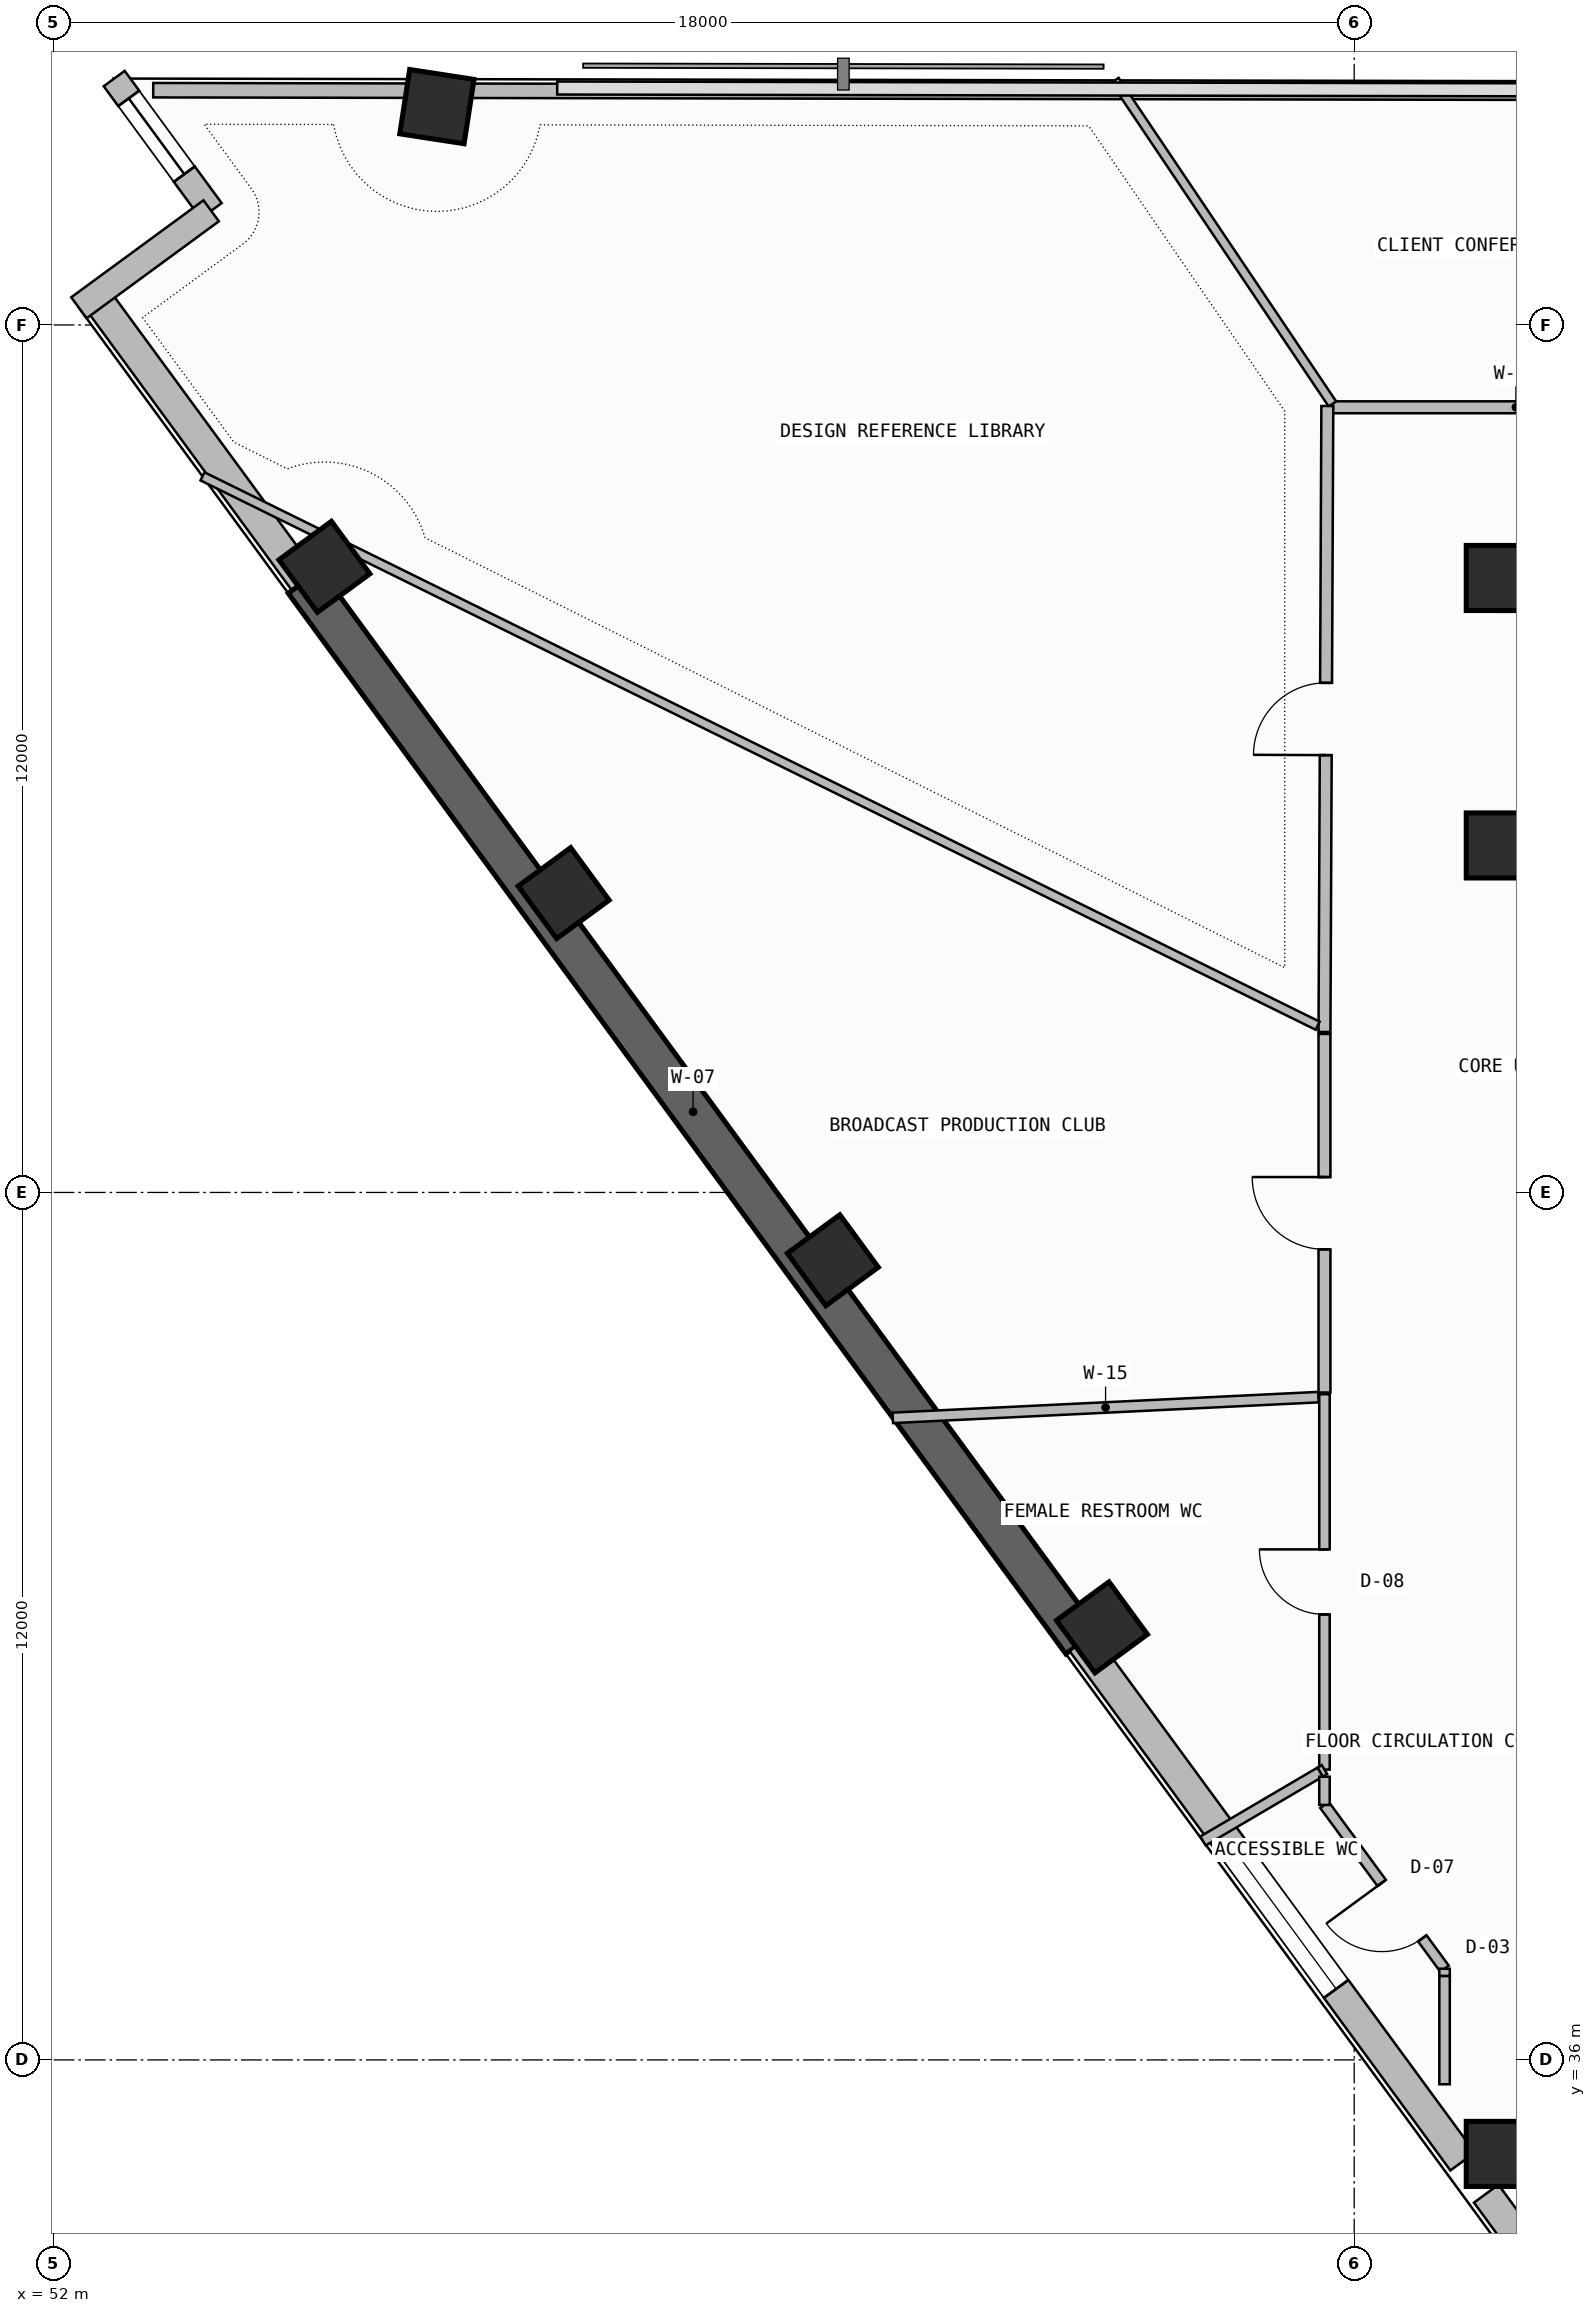
"""IFC4 building model, lengths in metres.
Left out: names, types, materials, properties, quantities, classifications, styles, units other than length and angle.
Written with IfcOpenShell. Run it as: python <this file> out.ifc"""

import sys

from ifc_helpers import new_model, si_unit, direction, frame, frame_2d, origin, origin_2d, place, context, subcontext, project, spatial, rectangle, extrude, element, fill, save


model = new_model("IFC4")
c1 = context("Model", 3, precision=1e-05, world=origin(), true_north=direction((0.0, 1.0)))
c2 = subcontext(c1, "Body", "Model", "MODEL_VIEW")
j1 = project(units=[si_unit("LENGTHUNIT", "METRE"), si_unit("PLANEANGLEUNIT", "RADIAN")], contexts=[c1])
p1 = place(None, origin())
s1 = spatial("IfcSite", under=j1, at=p1, CompositionType="ELEMENT")
p2 = place(p1, origin())
s2 = spatial("IfcBuilding", under=s1, at=p2, CompositionType="ELEMENT")
p3 = place(p2, frame((0.0, 0.0, 257.22)))
s3 = spatial("IfcBuildingStorey", under=s2, at=p3, CompositionType="ELEMENT", Elevation=257.22)
p4 = place(p3, frame((72.0, 56.35, -0.26), z_axis=(0.0, 0.0, 1.0), x_axis=(1.0, 0.0, 0.0)))
e1 = element("IfcWall", 1, at=p4, inside=s3, PredefinedType="SHEAR", context=c2, shape_type="SweptSolid", body=[
    extrude(rectangle(XDim=13.6, YDim=0.6, at=frame_2d((6.8, 0.0))), origin(), (0.0, 0.0, 1.0), 3.52),
])
for number, where, z_axis, x_axis in (
    (2, (72.0, 34.7, 0.0), (0.0, 0.0, 1.0), (1.0, 0.0, 0.0)),
    (3, (72.0, 52.8, 0.0), (0.0, 0.0, 1.0), (1.0, 0.0, 0.0)),
    (4, (72.0, 56.5, 0.0), (0.0, 0.0, 1.0), (1.0, 0.0, 0.0)),
    (5, (57.309, 63.021, 0.0), (0.0, 0.0, 1.0), (0.152, 0.988, 0.0)),
    (6, (55.753, 56.654, 0.0), (0.0, 0.0, 1.0), (-0.591, 0.806, 0.0)),
    (7, (59.063, 52.14, 0.0), (0.0, 0.0, 1.0), (-0.591, 0.806, 0.0)),
    (8, (62.787, 47.062, 0.0), (0.0, 0.0, 1.0), (-0.591, 0.806, 0.0)),
    (9, (66.51, 41.983, 0.0), (0.0, 0.0, 1.0), (-0.591, 0.806, 0.0)),
):
    element("IfcColumn", number, at=place(p3, frame(where, z_axis=z_axis, x_axis=x_axis)), inside=s3, PredefinedType="COLUMN", context=c2, shape_type="SweptSolid", body=[
        extrude(rectangle(XDim=0.9, YDim=0.9, at=origin_2d()), origin(), (0.0, 0.0, 1.0), 3.52),
    ])
p5 = place(p3, frame((52.579, 60.4, 0.0), z_axis=(0.0, 0.0, 1.0), x_axis=(0.591311800505, -0.806443026248, 0.0)))
e10 = element("IfcWall", 10, at=p5, inside=s3, PredefinedType="SOLIDWALL", context=c2, shape_type="SweptSolid", body=[
    extrude(rectangle(XDim=4.898, YDim=0.42, at=frame_2d((2.449, 0.0))), origin(), (0.0, 0.0, 1.0), 2.645),
])
p6 = place(p3, frame((55.475, 56.45, -0.26), z_axis=(0.0, 0.0, 1.0), x_axis=(0.591309555876, -0.806444672082, 0.0)))
e11 = element("IfcWall", 11, at=p6, inside=s3, PredefinedType="SHEAR", context=c2, shape_type="SweptSolid", body=[
    extrude(rectangle(XDim=18.192, YDim=0.55, at=frame_2d((9.096, 0.0))), origin(), (0.0, 0.0, 1.0), 3.52),
])
p7 = place(p3, frame((66.232, 41.779, 0.0), z_axis=(0.0, 0.0, 1.0), x_axis=(0.591309008949, -0.806445073105, 0.0)))
e12 = element("IfcWall", 12, at=p7, inside=s3, PredefinedType="SOLIDWALL", context=c2, shape_type="SweptSolid", body=[
    extrude(rectangle(XDim=8.908, YDim=0.42, at=frame_2d((4.454, 0.0))), origin(), (0.0, 0.0, 1.0), 2.645),
])
p8 = place(p7, frame((3.549, 0.0, 1.1)))
e13 = element("IfcOpeningElement", 13, at=p8, cuts=e12, PredefinedType="OPENING", context=c2, shape_type="SweptSolid", body=[
    extrude(rectangle(XDim=2.4, YDim=1.2, at=frame_2d((1.2, 0.6))), frame((0.0, 0.22, 0.0), z_axis=(0.0, -1.0, 0.0), x_axis=(1.0, 0.0, 0.0)), (0.0, 0.0, 1.0), 0.44),
])
p9 = place(p3, frame((71.826, 34.15, 0.0), z_axis=(0.0, 0.0, 1.0), x_axis=(0.591315835946, -0.806440067308, 0.0)))
e14 = element("IfcWall", 14, at=p9, inside=s3, PredefinedType="SOLIDWALL", context=c2, shape_type="SweptSolid", body=[
    extrude(rectangle(XDim=2.434, YDim=0.42, at=frame_2d((1.217, 0.0))), origin(), (0.0, 0.0, 1.0), 3.26),
])
p10 = place(p3, frame((52.845, 63.409, 0.0), z_axis=(0.0, 0.0, 1.0), x_axis=(0.591251685745, -0.806487101015, 0.0)))
e15 = element("IfcWall", 15, at=p10, inside=s3, PredefinedType="SOLIDWALL", context=c2, shape_type="SweptSolid", body=[
    extrude(rectangle(XDim=2.269, YDim=0.36, at=frame_2d((1.134, 0.0))), origin(), (0.0, 0.0, 1.0), 3.26),
])
p11 = place(p10, frame((0.34, 0.0, 0.45)))
e16 = element("IfcOpeningElement", 16, at=p11, cuts=e15, PredefinedType="OPENING", context=c2, shape_type="SweptSolid", body=[
    extrude(rectangle(XDim=1.3, YDim=2.4, at=frame_2d((0.65, 1.2))), frame((0.0, 0.19, 0.0), z_axis=(0.0, -1.0, 0.0), x_axis=(1.0, 0.0, 0.0)), (0.0, 0.0, 1.0), 0.38),
])
p12 = place(p3, frame((54.187, 61.579, 0.0), z_axis=(0.0, 0.0, 1.0), x_axis=(-0.806449475274, -0.591303005092, 0.0)))
e17 = element("IfcWall", 17, at=p12, inside=s3, PredefinedType="SOLIDWALL", context=c2, shape_type="SweptSolid", body=[
    extrude(rectangle(XDim=2.268, YDim=0.36, at=frame_2d((1.134, 0.0))), origin(), (0.0, 0.0, 1.0), 3.26),
])
p13 = place(p3, frame((83.332, 63.193, 0.0), z_axis=(0.0, 0.0, 1.0), x_axis=(-0.999998363757, 0.001809000383, 0.0)))
e18 = element("IfcWall", 18, at=p13, inside=s3, PredefinedType="PARAPET", context=c2, shape_type="SweptSolid", body=[
    extrude(rectangle(XDim=25.777, YDim=0.2, at=frame_2d((12.889, 0.0))), origin(), (0.0, 0.0, 1.0), 1.15),
])
p14 = place(p3, frame((57.064, 63.241, 0.0), z_axis=(0.0, 0.0, 1.0), x_axis=(-0.999998274159, 0.001857869529, 0.0)))
e19 = element("IfcWall", 19, at=p14, inside=s3, PredefinedType="PARAPET", context=c2, shape_type="SweptSolid", body=[
    extrude(rectangle(XDim=3.679, YDim=0.2, at=frame_2d((1.84, 0.0))), origin(), (0.0, 0.0, 1.0), 1.15),
])
p15 = place(p3, frame((69.589, 45.208, 0.0), z_axis=(0.0, 0.0, 1.0), x_axis=(0.0, -1.0, 0.0)))
e20 = element("IfcWall", 20, at=p15, inside=s3, PredefinedType="PARTITIONING", context=c2, shape_type="SweptSolid", body=[
    extrude(rectangle(XDim=5.192, YDim=0.145, at=frame_2d((2.596, 0.0))), origin(), (0.0, 0.0, 1.0), 3.26),
])
p16 = place(p15, frame((2.146, 0.0, 0.0)))
e21 = element("IfcOpeningElement", 21, at=p16, cuts=e20, PredefinedType="OPENING", context=c2, shape_type="SweptSolid", body=[
    extrude(rectangle(XDim=0.9, YDim=2.1, at=frame_2d((0.45, 1.05))), frame((0.0, 0.083, 0.0), z_axis=(0.0, -1.0, 0.0), x_axis=(1.0, 0.0, 0.0)), (0.0, 0.0, 1.0), 0.165),
])
p17 = place(p3, frame((69.589, 40.016, 0.0), z_axis=(0.0, 0.0, 1.0), x_axis=(-0.855337907093, -0.518070520963, 0.0)))
e22 = element("IfcWall", 22, at=p17, inside=s3, PredefinedType="PARTITIONING", context=c2, shape_type="SweptSolid", body=[
    extrude(rectangle(XDim=0.07, YDim=0.145, at=frame_2d((0.035, 0.0))), origin(), (0.0, 0.0, 1.0), 3.26),
])
p18 = place(p3, frame((69.528, 39.981, 0.0), z_axis=(0.0, 0.0, 1.0), x_axis=(-0.862157936866, -0.506639607512, 0.0)))
e23 = element("IfcWall", 23, at=p18, inside=s3, PredefinedType="PARTITIONING", context=c2, shape_type="SweptSolid", body=[
    extrude(rectangle(XDim=1.879, YDim=0.145, at=frame_2d((0.939, 0.0))), origin(), (0.0, 0.0, 1.0), 3.26),
])
p19 = place(p3, frame((63.616, 44.882, 0.0), z_axis=(0.0, 0.0, 1.0), x_axis=(0.99881716391, 0.048623791277, 0.0)))
e24 = element("IfcWall", 24, at=p19, inside=s3, PredefinedType="PARTITIONING", context=c2, shape_type="SweptSolid", body=[
    extrude(rectangle(XDim=5.895, YDim=0.145, at=frame_2d((2.947, 0.0))), origin(), (0.0, 0.0, 1.0), 2.645),
])
p20 = place(p3, frame((69.589, 39.527, 0.0), z_axis=(0.0, 0.0, 1.0), x_axis=(0.591303389729, -0.806449193251, 0.0)))
e25 = element("IfcWall", 25, at=p20, inside=s3, PredefinedType="PARTITIONING", context=c2, shape_type="SweptSolid", body=[
    extrude(rectangle(XDim=2.81, YDim=0.145, at=frame_2d((1.405, 0.0))), origin(), (0.0, 0.0, 1.0), 3.26),
])
p21 = place(p20, frame((1.338, 0.0, 0.0)))
e26 = element("IfcOpeningElement", 26, at=p21, cuts=e25, PredefinedType="OPENING", context=c2, shape_type="SweptSolid", body=[
    extrude(rectangle(XDim=0.95, YDim=2.15, at=frame_2d((0.475, 1.075))), frame((0.0, 0.083, 0.0), z_axis=(0.0, -1.0, 0.0), x_axis=(1.0, 0.0, 0.0)), (0.0, 0.0, 1.0), 0.165),
])
p22 = place(p3, frame((69.589, 39.917, 0.0), z_axis=(0.0, 0.0, 1.0), x_axis=(0.0, -1.0, 0.0)))
e27 = element("IfcWall", 27, at=p22, inside=s3, PredefinedType="PARTITIONING", context=c2, shape_type="SweptSolid", body=[
    extrude(rectangle(XDim=0.39, YDim=0.145, at=frame_2d((0.195, 0.0))), origin(), (0.0, 0.0, 1.0), 3.26),
])
p23 = place(p3, frame((71.25, 37.261, 0.0), z_axis=(0.0, 0.0, 1.0), x_axis=(0.0, -1.0, 0.0)))
e28 = element("IfcWall", 28, at=p23, inside=s3, PredefinedType="PARTITIONING", context=c2, shape_type="SweptSolid", body=[
    extrude(rectangle(XDim=0.102, YDim=0.145, at=frame_2d((0.051, 0.0))), origin(), (0.0, 0.0, 1.0), 3.26),
])
p24 = place(p3, frame((77.35, 58.861, 0.0), z_axis=(0.0, 0.0, 1.0), x_axis=(-1.0, 0.0, 0.0)))
e29 = element("IfcWall", 29, at=p24, inside=s3, PredefinedType="PARTITIONING", context=c2, shape_type="SweptSolid", body=[
    extrude(rectangle(XDim=7.651, YDim=0.165, at=frame_2d((3.826, 0.0))), origin(), (0.0, 0.0, 1.0), 3.26),
])
p25 = place(p24, frame((1.575, 0.0, 0.0)))
e30 = element("IfcOpeningElement", 30, at=p25, cuts=e29, PredefinedType="OPENING", context=c2, shape_type="SweptSolid", body=[
    extrude(rectangle(XDim=1.0, YDim=2.2, at=frame_2d((0.5, 1.1))), frame((0.0, 0.093, 0.0), z_axis=(0.0, -1.0, 0.0), x_axis=(1.0, 0.0, 0.0)), (0.0, 0.0, 1.0), 0.185),
])
p26 = place(p3, frame((69.699, 58.907, 0.0), z_axis=(0.0, 0.0, 1.0), x_axis=(-0.557996514908, 0.829843292044, 0.0)))
e31 = element("IfcWall", 31, at=p26, inside=s3, PredefinedType="PARTITIONING", context=c2, shape_type="SweptSolid", body=[
    extrude(rectangle(XDim=5.394, YDim=0.125, at=frame_2d((2.697, 0.0))), origin(), (0.0, 0.0, 1.0), 3.26),
])
p27 = place(p3, frame((69.628, 58.879, 0.0), z_axis=(0.0, 0.0, 1.0), x_axis=(-0.00456744982, -0.999989569147, 0.0)))
e32 = element("IfcWall", 32, at=p27, inside=s3, PredefinedType="PARTITIONING", context=c2, shape_type="SweptSolid", body=[
    extrude(rectangle(XDim=8.659, YDim=0.165, at=frame_2d((4.33, 0.0))), origin(), (0.0, 0.0, 1.0), 2.745),
])
p28 = place(p27, frame((3.83, 0.0, 0.0)))
e33 = element("IfcOpeningElement", 33, at=p28, cuts=e32, PredefinedType="OPENING", context=c2, shape_type="SweptSolid", body=[
    extrude(rectangle(XDim=1.0, YDim=2.2, at=frame_2d((0.5, 1.1))), frame((0.0, 0.093, 0.0), z_axis=(0.0, -1.0, 0.0), x_axis=(1.0, 0.0, 0.0)), (0.0, 0.0, 1.0), 0.185),
])
p29 = place(p3, frame((69.494, 50.306, 0.0), z_axis=(0.0, 0.0, 1.0), x_axis=(-0.897066104393, 0.441896372862, 0.0)))
e34 = element("IfcWall", 34, at=p29, inside=s3, PredefinedType="PARTITIONING", context=c2, shape_type="SweptSolid", body=[
    extrude(rectangle(XDim=17.198, YDim=0.125, at=frame_2d((8.599, 0.0))), origin(), (0.0, 0.0, 1.0), 2.645),
])
p30 = place(p3, frame((69.589, 50.193, 0.0), z_axis=(0.0, 0.0, 1.0), x_axis=(0.0, -1.0, 0.0)))
e35 = element("IfcWall", 35, at=p30, inside=s3, PredefinedType="PARTITIONING", context=c2, shape_type="SweptSolid", body=[
    extrude(rectangle(XDim=4.96, YDim=0.165, at=frame_2d((2.48, 0.0))), origin(), (0.0, 0.0, 1.0), 3.26),
])
p31 = place(p30, frame((1.98, 0.0, 0.0)))
e36 = element("IfcOpeningElement", 36, at=p31, cuts=e35, PredefinedType="OPENING", context=c2, shape_type="SweptSolid", body=[
    extrude(rectangle(XDim=1.0, YDim=2.2, at=frame_2d((0.5, 1.1))), frame((0.0, 0.093, 0.0), z_axis=(0.0, -1.0, 0.0), x_axis=(1.0, 0.0, 0.0)), (0.0, 0.0, 1.0), 0.185),
])
p32 = place(p3, frame((71.25, 37.16, 0.0), z_axis=(0.0, 0.0, 1.0), x_axis=(0.0, -1.0, 0.0)))
e37 = element("IfcWall", 37, at=p32, inside=s3, PredefinedType="PARTITIONING", context=c2, shape_type="SweptSolid", body=[
    extrude(rectangle(XDim=1.497, YDim=0.145, at=frame_2d((0.748, 0.0))), origin(), (0.0, 0.0, 1.0), 3.26),
])
p33 = place(p8, origin())
e38 = element("IfcWindow", 38, at=p33, inside=s3, PartitioningType="SINGLE_PANEL", PredefinedType="WINDOW", context=c2, shape_type="SweptSolid", body=[
    extrude(rectangle(XDim=2.4, YDim=1.2, at=frame_2d((1.2, 0.6))), frame((0.0, 0.03, 0.0), z_axis=(0.0, -1.0, 0.0), x_axis=(1.0, 0.0, 0.0)), (0.0, 0.0, 1.0), 0.06),
])
fill(e13, e38)
p34 = place(p11, origin())
e39 = element("IfcWindow", 39, at=p34, inside=s3, PartitioningType="SINGLE_PANEL", PredefinedType="WINDOW", context=c2, shape_type="SweptSolid", body=[
    extrude(rectangle(XDim=1.3, YDim=2.4, at=frame_2d((0.65, 1.2))), frame((0.0, 0.03, 0.0), z_axis=(0.0, -1.0, 0.0), x_axis=(1.0, 0.0, 0.0)), (0.0, 0.0, 1.0), 0.06),
])
fill(e16, e39)
p35 = place(p16, frame((0.9, 0.0, 0.0), z_axis=(0.0, 0.0, 1.0), x_axis=(-1.0, 0.0, 0.0)))
e40 = element("IfcDoor", 40, at=p35, inside=s3, OperationType="SINGLE_SWING_RIGHT", PredefinedType="DOOR", context=c2, shape_type="SweptSolid", body=[
    extrude(rectangle(XDim=0.9, YDim=2.1, at=frame_2d((0.45, 1.05))), frame((0.0, 0.025, 0.0), z_axis=(0.0, -1.0, 0.0), x_axis=(1.0, 0.0, 0.0)), (0.0, 0.0, 1.0), 0.05),
])
fill(e21, e40)
p36 = place(p21, frame((0.95, 0.0, 0.0), z_axis=(0.0, 0.0, 1.0), x_axis=(-1.0, 0.0, 0.0)))
e41 = element("IfcDoor", 41, at=p36, inside=s3, OperationType="SINGLE_SWING_RIGHT", PredefinedType="DOOR", context=c2, shape_type="SweptSolid", body=[
    extrude(rectangle(XDim=0.95, YDim=2.15, at=frame_2d((0.475, 1.075))), frame((0.0, 0.025, 0.0), z_axis=(0.0, -1.0, 0.0), x_axis=(1.0, 0.0, 0.0)), (0.0, 0.0, 1.0), 0.05),
])
fill(e26, e41)
p37 = place(p28, frame((1.0, 0.0, 0.0), z_axis=(0.0, 0.0, 1.0), x_axis=(-1.0, 0.0, 0.0)))
e42 = element("IfcDoor", 42, at=p37, inside=s3, OperationType="SINGLE_SWING_LEFT", PredefinedType="DOOR", context=c2, shape_type="SweptSolid", body=[
    extrude(rectangle(XDim=1.0, YDim=2.2, at=frame_2d((0.5, 1.1))), frame((0.0, 0.025, 0.0), z_axis=(0.0, -1.0, 0.0), x_axis=(1.0, 0.0, 0.0)), (0.0, 0.0, 1.0), 0.05),
])
fill(e33, e42)
p38 = place(p31, frame((1.0, 0.0, 0.0), z_axis=(0.0, 0.0, 1.0), x_axis=(-1.0, 0.0, 0.0)))
e43 = element("IfcDoor", 43, at=p38, inside=s3, OperationType="SINGLE_SWING_RIGHT", PredefinedType="DOOR", context=c2, shape_type="SweptSolid", body=[
    extrude(rectangle(XDim=1.0, YDim=2.2, at=frame_2d((0.5, 1.1))), frame((0.0, 0.025, 0.0), z_axis=(0.0, -1.0, 0.0), x_axis=(1.0, 0.0, 0.0)), (0.0, 0.0, 1.0), 0.05),
])
fill(e36, e43)
save(model, sys.argv[1])
